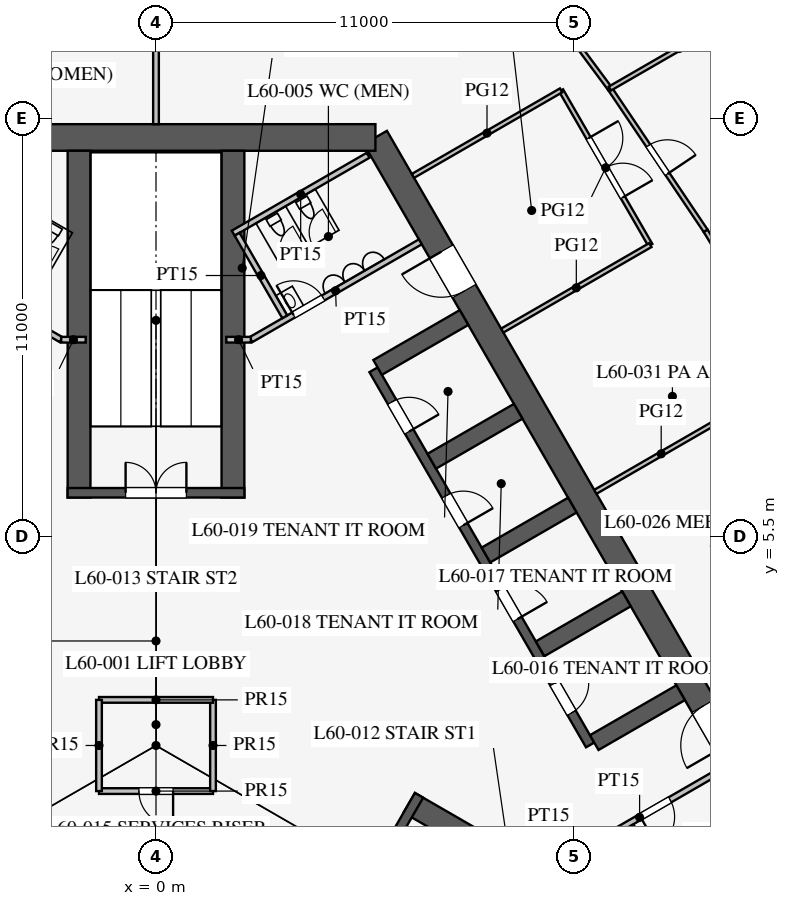
"""IFC4 building model, lengths in metres.
Left out: names, types, materials, properties, quantities, classifications, styles, units other than length and angle.
Written with IfcOpenShell. Run it as: python <this file> out.ifc"""

import sys

from ifc_helpers import new_model, si_unit, direction, frame, frame_2d, origin, place, context, subcontext, project, spatial, rectangle, extrude, element, fill, save


model = new_model("IFC4")
c1 = context("Model", 3, precision=1e-05, world=origin(), true_north=direction((0.0, 1.0)))
c2 = subcontext(c1, "Body", "Model", "MODEL_VIEW")
j1 = project(units=[si_unit("LENGTHUNIT", "METRE"), si_unit("PLANEANGLEUNIT", "RADIAN")], contexts=[c1])
p1 = place(None, origin())
s1 = spatial("IfcSite", under=j1, at=p1, CompositionType="ELEMENT")
p2 = place(p1, origin())
s2 = spatial("IfcBuilding", under=s1, at=p2, CompositionType="ELEMENT")
p3 = place(p2, frame((0.0, 0.0, 261.1)))
s3 = spatial("IfcBuildingStorey", under=s2, at=p3, CompositionType="ELEMENT", Elevation=261.1)
p4 = place(p3, frame((16.743, -3.0, 0.0), z_axis=(0.0, 0.0, 1.0), x_axis=(-0.500002442456, 0.866023993627, 0.0)))
e1 = element("IfcWall", 1, at=p4, inside=s3, PredefinedType="SHEAR", context=c2, shape_type="SweptSolid", body=[
    extrude(rectangle(XDim=21.939, YDim=0.7, at=frame_2d((10.97, 0.0))), origin(), (0.0, 0.0, 1.0), 4.2),
])
p5 = place(p4, frame((17.27, 0.0, 0.0)))
e2 = element("IfcOpeningElement", 2, at=p5, cuts=e1, PredefinedType="OPENING", context=c2, shape_type="SweptSolid", body=[
    extrude(rectangle(XDim=1.2, YDim=2.1, at=frame_2d((0.6, 1.05))), frame((0.0, 0.36, 0.0), z_axis=(0.0, -1.0, 0.0), x_axis=(1.0, 0.0, 0.0)), (0.0, 0.0, 1.0), 0.72),
])
p6 = place(p4, frame((3.47, 0.0, 0.0)))
e3 = element("IfcOpeningElement", 3, at=p6, cuts=e1, PredefinedType="OPENING", context=c2, shape_type="SweptSolid", body=[
    extrude(rectangle(XDim=1.2, YDim=2.1, at=frame_2d((0.6, 1.05))), frame((0.0, 0.36, 0.0), z_axis=(0.0, -1.0, 0.0), x_axis=(1.0, 0.0, 0.0)), (0.0, 0.0, 1.0), 0.72),
])
p7 = place(p3, frame((5.773, 16.0, 0.0), z_axis=(0.0, 0.0, 1.0), x_axis=(-1.0, 0.0, 0.0)))
e4 = element("IfcWall", 4, at=p7, inside=s3, PredefinedType="SHEAR", context=c2, shape_type="SweptSolid", body=[
    extrude(rectangle(XDim=11.547, YDim=0.7, at=frame_2d((5.773, 0.0))), origin(), (0.0, 0.0, 1.0), 4.2),
])
p8 = place(p3, frame((11.424, 0.014, 0.0), z_axis=(0.0, 0.0, 1.0), x_axis=(-0.500001763848, 0.866024385424, 0.0)))
e5 = element("IfcWall", 5, at=p8, inside=s3, PredefinedType="SHEAR", context=c2, shape_type="SweptSolid", body=[
    extrude(rectangle(XDim=11.4, YDim=0.25, at=frame_2d((5.7, 0.0))), origin(), (0.0, 0.0, 1.0), 4.2),
])
p9 = place(p8, frame((0.975, 0.0, 0.0)))
e6 = element("IfcOpeningElement", 6, at=p9, cuts=e5, PredefinedType="OPENING", context=c2, shape_type="SweptSolid", body=[
    extrude(rectangle(XDim=0.9, YDim=2.1, at=frame_2d((0.45, 1.05))), frame((0.0, 0.135, 0.0), z_axis=(0.0, -1.0, 0.0), x_axis=(1.0, 0.0, 0.0)), (0.0, 0.0, 1.0), 0.27),
])
p10 = place(p8, frame((3.825, 0.0, 0.0)))
e7 = element("IfcOpeningElement", 7, at=p10, cuts=e5, PredefinedType="OPENING", context=c2, shape_type="SweptSolid", body=[
    extrude(rectangle(XDim=0.9, YDim=2.1, at=frame_2d((0.45, 1.05))), frame((0.0, 0.135, 0.0), z_axis=(0.0, -1.0, 0.0), x_axis=(1.0, 0.0, 0.0)), (0.0, 0.0, 1.0), 0.27),
])
p11 = place(p8, frame((6.675, 0.0, 0.0)))
e8 = element("IfcOpeningElement", 8, at=p11, cuts=e5, PredefinedType="OPENING", context=c2, shape_type="SweptSolid", body=[
    extrude(rectangle(XDim=0.9, YDim=2.1, at=frame_2d((0.45, 1.05))), frame((0.0, 0.135, 0.0), z_axis=(0.0, -1.0, 0.0), x_axis=(1.0, 0.0, 0.0)), (0.0, 0.0, 1.0), 0.27),
])
p12 = place(p8, frame((9.525, 0.0, 0.0)))
e9 = element("IfcOpeningElement", 9, at=p12, cuts=e5, PredefinedType="OPENING", context=c2, shape_type="SweptSolid", body=[
    extrude(rectangle(XDim=0.9, YDim=2.1, at=frame_2d((0.45, 1.05))), frame((0.0, 0.135, 0.0), z_axis=(0.0, -1.0, 0.0), x_axis=(1.0, 0.0, 0.0)), (0.0, 0.0, 1.0), 0.27),
])
for number, where, z_axis, x_axis in (
    (10, (11.532, 0.076, 0.0), (0.0, 0.0, 1.0), (0.866, 0.5, 0.0)),
    (11, (10.107, 2.544, 0.0), (0.0, 0.0, 1.0), (0.866, 0.5, 0.0)),
    (12, (8.682, 5.012, 0.0), (0.0, 0.0, 1.0), (0.866, 0.5, 0.0)),
    (13, (7.257, 7.481, 0.0), (0.0, 0.0, 1.0), (0.866, 0.5, 0.0)),
    (14, (5.832, 9.949, 0.0), (0.0, 0.0, 1.0), (0.866, 0.5, 0.0)),
):
    element("IfcWall", number, at=place(p3, frame(where, z_axis=z_axis, x_axis=x_axis)), inside=s3, PredefinedType="SHEAR", context=c2, shape_type="SweptSolid", body=[
        extrude(rectangle(XDim=2.625, YDim=0.45, at=frame_2d((1.312, 0.0))), origin(), (0.0, 0.0, 1.0), 4.2),
    ])
p13 = place(p3, frame((6.663, -1.509, 0.0), z_axis=(0.0, 0.0, 1.0), x_axis=(0.866028310072, -0.499994966129, 0.0)))
e15 = element("IfcWall", 15, at=p13, inside=s3, PredefinedType="SHEAR", context=c2, shape_type="SweptSolid", body=[
    extrude(rectangle(XDim=9.125, YDim=0.6, at=frame_2d((4.562, 0.0))), origin(), (0.0, 0.0, 1.0), 4.2),
])
p14 = place(p3, frame((4.597, -5.339, 0.0), z_axis=(0.0, 0.0, 1.0), x_axis=(0.499984536904, 0.866034331223, 0.0)))
e16 = element("IfcWall", 16, at=p14, inside=s3, PredefinedType="SHEAR", context=c2, shape_type="SweptSolid", body=[
    extrude(rectangle(XDim=4.65, YDim=0.25, at=frame_2d((2.325, 0.0))), origin(), (0.0, 0.0, 1.0), 4.2),
])
p15 = place(p14, frame((1.525, 0.0, 0.0)))
e17 = element("IfcOpeningElement", 17, at=p15, cuts=e16, PredefinedType="OPENING", context=c2, shape_type="SweptSolid", body=[
    extrude(rectangle(XDim=1.6, YDim=2.1, at=frame_2d((0.8, 1.05))), frame((0.0, 0.135, 0.0), z_axis=(0.0, -1.0, 0.0), x_axis=(1.0, 0.0, 0.0)), (0.0, 0.0, 1.0), 0.27),
])
for number, where, z_axis, x_axis in (
    (18, (2.025, 6.525, 0.0), (0.0, 0.0, 1.0), (0.0, 1.0, 0.0)),
    (19, (-2.025, 6.525, 0.0), (0.0, 0.0, 1.0), (0.0, 1.0, 0.0)),
):
    element("IfcWall", number, at=place(p3, frame(where, z_axis=z_axis, x_axis=x_axis)), inside=s3, PredefinedType="SHEAR", context=c2, shape_type="SweptSolid", body=[
        extrude(rectangle(XDim=9.125, YDim=0.6, at=frame_2d((4.562, 0.0))), origin(), (0.0, 0.0, 1.0), 4.2),
    ])
p16 = place(p3, frame((2.325, 6.65, 0.0), z_axis=(0.0, 0.0, 1.0), x_axis=(-1.0, 0.0, 0.0)))
e20 = element("IfcWall", 20, at=p16, inside=s3, PredefinedType="SHEAR", context=c2, shape_type="SweptSolid", body=[
    extrude(rectangle(XDim=4.65, YDim=0.25, at=frame_2d((2.325, 0.0))), origin(), (0.0, 0.0, 1.0), 4.2),
])
p17 = place(p16, frame((1.525, 0.0, 0.0)))
e21 = element("IfcOpeningElement", 21, at=p17, cuts=e20, PredefinedType="OPENING", context=c2, shape_type="SweptSolid", body=[
    extrude(rectangle(XDim=1.6, YDim=2.1, at=frame_2d((0.8, 1.05))), frame((0.0, 0.135, 0.0), z_axis=(0.0, -1.0, 0.0), x_axis=(1.0, 0.0, 0.0)), (0.0, 0.0, 1.0), 0.27),
])
p18 = place(p3, frame((2.495, 10.678, 0.0), z_axis=(0.0, 0.0, 1.0), x_axis=(0.866037967349, 0.499978238636, 0.0)))
e22 = element("IfcWall", 22, at=p18, inside=s3, PredefinedType="PARTITIONING", context=c2, shape_type="SweptSolid", body=[
    extrude(rectangle(XDim=5.15, YDim=0.15, at=frame_2d((2.575, 0.0))), origin(), (0.0, 0.0, 1.0), 3.95),
])
p19 = place(p18, frame((1.3, 0.0, 0.0)))
e23 = element("IfcOpeningElement", 23, at=p19, cuts=e22, PredefinedType="OPENING", context=c2, shape_type="SweptSolid", body=[
    extrude(rectangle(XDim=0.9, YDim=2.1, at=frame_2d((0.45, 1.05))), frame((0.0, 0.085, 0.0), z_axis=(0.0, -1.0, 0.0), x_axis=(1.0, 0.0, 0.0)), (0.0, 0.0, 1.0), 0.17),
])
p20 = place(p3, frame((10.495, -3.178, 0.0), z_axis=(0.0, 0.0, 1.0), x_axis=(0.866037967349, 0.499978238636, 0.0)))
e24 = element("IfcWall", 24, at=p20, inside=s3, PredefinedType="PARTITIONING", context=c2, shape_type="SweptSolid", body=[
    extrude(rectangle(XDim=5.15, YDim=0.15, at=frame_2d((2.575, 0.0))), origin(), (0.0, 0.0, 1.0), 3.95),
])
p21 = place(p20, frame((2.6, 0.0, 0.0)))
e25 = element("IfcOpeningElement", 25, at=p21, cuts=e24, PredefinedType="OPENING", context=c2, shape_type="SweptSolid", body=[
    extrude(rectangle(XDim=0.9, YDim=2.1, at=frame_2d((0.45, 1.05))), frame((0.0, 0.085, 0.0), z_axis=(0.0, -1.0, 0.0), x_axis=(1.0, 0.0, 0.0)), (0.0, 0.0, 1.0), 0.17),
])
p22 = place(p3, frame((-2.495, 10.678, 0.0), z_axis=(0.0, 0.0, 1.0), x_axis=(-0.866037967349, 0.499978238636, 0.0)))
e26 = element("IfcWall", 26, at=p22, inside=s3, PredefinedType="PARTITIONING", context=c2, shape_type="SweptSolid", body=[
    extrude(rectangle(XDim=5.15, YDim=0.15, at=frame_2d((2.575, 0.0))), origin(), (0.0, 0.0, 1.0), 3.95),
])
p23 = place(p22, frame((2.6, 0.0, 0.0)))
e27 = element("IfcOpeningElement", 27, at=p23, cuts=e26, PredefinedType="OPENING", context=c2, shape_type="SweptSolid", body=[
    extrude(rectangle(XDim=0.9, YDim=2.1, at=frame_2d((0.45, 1.05))), frame((0.0, 0.085, 0.0), z_axis=(0.0, -1.0, 0.0), x_axis=(1.0, 0.0, 0.0)), (0.0, 0.0, 1.0), 0.17),
])
for number, where, z_axis, x_axis in (
    (28, (2.495, 10.678, 0.0), (0.0, 0.0, 1.0), (-1.0, 0.0, 0.0)),
    (29, (-2.495, 10.678, 0.0), (0.0, 0.0, 1.0), (1.0, 0.0, 0.0)),
):
    element("IfcWall", number, at=place(p3, frame(where, z_axis=z_axis, x_axis=x_axis)), inside=s3, PredefinedType="PARTITIONING", context=c2, shape_type="SweptSolid", body=[
        extrude(rectangle(XDim=0.645, YDim=0.15, at=frame_2d((0.323, 0.0))), origin(), (0.0, 0.0, 1.0), 3.95),
    ])
p24 = place(p3, frame((2.031, 13.482, 0.0), z_axis=(0.0, 0.0, 1.0), x_axis=(0.866050731258, 0.499956128963, 0.0)))
e30 = element("IfcWall", 30, at=p24, inside=s3, PredefinedType="PARTITIONING", context=c2, shape_type="SweptSolid", body=[
    extrude(rectangle(XDim=4.1, YDim=0.15, at=frame_2d((2.05, 0.0))), origin(), (0.0, 0.0, 1.0), 3.95),
])
p25 = place(p3, frame((3.389, 11.281, 0.0), z_axis=(0.0, 0.0, 1.0), x_axis=(-0.499989096993, 0.866031698547, 0.0)))
e31 = element("IfcWall", 31, at=p25, inside=s3, PredefinedType="PARTITIONING", context=c2, shape_type="SweptSolid", body=[
    extrude(rectangle(XDim=2.51, YDim=0.15, at=frame_2d((1.255, 0.0))), origin(), (0.0, 0.0, 1.0), 3.95),
])
p26 = place(p3, frame((-1.5, -1.2, 0.0), z_axis=(0.0, 0.0, 1.0), x_axis=(1.0, 0.0, 0.0)))
e32 = element("IfcWall", 32, at=p26, inside=s3, PredefinedType="PARTITIONING", context=c2, shape_type="SweptSolid", body=[
    extrude(rectangle(XDim=3.0, YDim=0.15, at=frame_2d((1.5, 0.0))), origin(), (0.0, 0.0, 1.0), 3.95),
])
p27 = place(p26, frame((1.05, 0.0, 0.0)))
e33 = element("IfcOpeningElement", 33, at=p27, cuts=e32, PredefinedType="OPENING", context=c2, shape_type="SweptSolid", body=[
    extrude(rectangle(XDim=0.9, YDim=2.1, at=frame_2d((0.45, 1.05))), frame((0.0, 0.085, 0.0), z_axis=(0.0, -1.0, 0.0), x_axis=(1.0, 0.0, 0.0)), (0.0, 0.0, 1.0), 0.17),
])
p28 = place(p3, frame((1.5, -1.2, 0.0), z_axis=(0.0, 0.0, 1.0), x_axis=(0.0, 1.0, 0.0)))
e34 = element("IfcWall", 34, at=p28, inside=s3, PredefinedType="PARTITIONING", context=c2, shape_type="SweptSolid", body=[
    extrude(rectangle(XDim=2.4, YDim=0.15, at=frame_2d((1.2, 0.0))), origin(), (0.0, 0.0, 1.0), 3.95),
])
p29 = place(p3, frame((1.5, 1.2, 0.0), z_axis=(0.0, 0.0, 1.0), x_axis=(-1.0, 0.0, 0.0)))
e35 = element("IfcWall", 35, at=p29, inside=s3, PredefinedType="PARTITIONING", context=c2, shape_type="SweptSolid", body=[
    extrude(rectangle(XDim=3.0, YDim=0.15, at=frame_2d((1.5, 0.0))), origin(), (0.0, 0.0, 1.0), 3.95),
])
p30 = place(p3, frame((-1.5, 1.2, 0.0), z_axis=(0.0, 0.0, 1.0), x_axis=(0.0, -1.0, 0.0)))
e36 = element("IfcWall", 36, at=p30, inside=s3, PredefinedType="PARTITIONING", context=c2, shape_type="SweptSolid", body=[
    extrude(rectangle(XDim=2.4, YDim=0.15, at=frame_2d((1.2, 0.0))), origin(), (0.0, 0.0, 1.0), 3.95),
])
p31 = place(p3, frame((0.0, 16.35, 0.0), z_axis=(0.0, 0.0, 1.0), x_axis=(0.0, 1.0, 0.0)))
e37 = element("IfcWall", 37, at=p31, inside=s3, PredefinedType="PARTITIONING", context=c2, shape_type="SweptSolid", body=[
    extrude(rectangle(XDim=15.0, YDim=0.15, at=frame_2d((7.5, 0.0))), origin(), (0.0, 0.0, 1.0), 1.95),
])
p32 = place(p3, frame((13.009, 13.168, 0.0), z_axis=(0.0, 0.0, 1.0), x_axis=(-0.500016218704, 0.866016039709, 0.0)))
e38 = element("IfcWall", 38, at=p32, inside=s3, PredefinedType="PARTITIONING", context=c2, shape_type="SweptSolid", body=[
    extrude(rectangle(XDim=4.7, YDim=0.12, at=frame_2d((2.35, 0.0))), origin(), (0.0, 0.0, 1.0), 2.9),
])
p33 = place(p32, frame((1.45, 0.0, 0.15)))
e39 = element("IfcOpeningElement", 39, at=p33, cuts=e38, PredefinedType="OPENING", context=c2, shape_type="SweptSolid", body=[
    extrude(rectangle(XDim=1.8, YDim=2.1, at=frame_2d((0.9, 1.05))), frame((0.0, 0.07, 0.0), z_axis=(0.0, -1.0, 0.0), x_axis=(1.0, 0.0, 0.0)), (0.0, 0.0, 1.0), 0.14),
])
p34 = place(p3, frame((9.111, 10.918, 0.0), z_axis=(0.0, 0.0, 1.0), x_axis=(0.866031096941, 0.499990139034, 0.0)))
e40 = element("IfcWall", 40, at=p34, inside=s3, PredefinedType="PARTITIONING", context=c2, shape_type="SweptSolid", body=[
    extrude(rectangle(XDim=4.5, YDim=0.12, at=frame_2d((2.25, 0.0))), origin(), (0.0, 0.0, 1.0), 2.9),
])
p35 = place(p3, frame((6.761, 14.989, 0.0), z_axis=(0.0, 0.0, 1.0), x_axis=(0.866017533419, 0.500013631625, 0.0)))
e41 = element("IfcWall", 41, at=p35, inside=s3, PredefinedType="PARTITIONING", context=c2, shape_type="SweptSolid", body=[
    extrude(rectangle(XDim=4.5, YDim=0.12, at=frame_2d((2.25, 0.0))), origin(), (0.0, 0.0, 1.0), 2.9),
])
p36 = place(p3, frame((11.562, 6.675, 0.0), z_axis=(0.0, 0.0, 1.0), x_axis=(0.866026010844, 0.49999894854, 0.0)))
e42 = element("IfcWall", 42, at=p36, inside=s3, PredefinedType="PARTITIONING", context=c2, shape_type="SweptSolid", body=[
    extrude(rectangle(XDim=4.0, YDim=0.12, at=frame_2d((2.0, 0.0))), origin(), (0.0, 0.0, 1.0), 2.35),
])
p37 = place(p3, frame((14.361, 1.825, 0.0), z_axis=(0.0, 0.0, 1.0), x_axis=(0.866026010844, 0.49999894854, 0.0)))
e43 = element("IfcWall", 43, at=p37, inside=s3, PredefinedType="PARTITIONING", context=c2, shape_type="SweptSolid", body=[
    extrude(rectangle(XDim=4.0, YDim=0.12, at=frame_2d((2.0, 0.0))), origin(), (0.0, 0.0, 1.0), 2.9),
])
p38 = place(p3, frame((16.802, 9.7, 0.0), z_axis=(0.0, 0.0, 1.0), x_axis=(-0.519790350351, 0.85429385558, 0.0)))
e44 = element("IfcWall", 44, at=p38, inside=s3, PredefinedType="PARTITIONING", context=c2, shape_type="SweptSolid", body=[
    extrude(rectangle(XDim=4.501, YDim=0.12, at=frame_2d((2.25, 0.0))), origin(), (0.0, 0.0, 1.0), 2.9),
])
p39 = place(p3, frame((14.462, 13.546, 0.0), z_axis=(0.0, 0.0, 1.0), x_axis=(-0.55850386778, 0.829501916619, 0.0)))
e45 = element("IfcWall", 45, at=p39, inside=s3, PredefinedType="PARTITIONING", context=c2, shape_type="SweptSolid", body=[
    extrude(rectangle(XDim=4.511, YDim=0.12, at=frame_2d((2.255, 0.0))), origin(), (0.0, 0.0, 1.0), 2.9),
])
p40 = place(p39, frame((1.8, 0.0, 0.15)))
e46 = element("IfcOpeningElement", 46, at=p40, cuts=e45, PredefinedType="OPENING", context=c2, shape_type="SweptSolid", body=[
    extrude(rectangle(XDim=0.9, YDim=2.1, at=frame_2d((0.45, 1.05))), frame((0.0, 0.07, 0.0), z_axis=(0.0, -1.0, 0.0), x_axis=(1.0, 0.0, 0.0)), (0.0, 0.0, 1.0), 0.14),
])
p41 = place(p3, frame((11.943, 17.287, 0.0), z_axis=(0.0, 0.0, 1.0), x_axis=(-0.59613842716, 0.802881669777, 0.0)))
e47 = element("IfcWall", 47, at=p41, inside=s3, PredefinedType="PARTITIONING", context=c2, shape_type="SweptSolid", body=[
    extrude(rectangle(XDim=4.53, YDim=0.12, at=frame_2d((2.265, 0.0))), origin(), (0.0, 0.0, 1.0), 2.9),
])
p42 = place(p3, frame((11.943, 17.287, 0.0), z_axis=(0.0, 0.0, 1.0), x_axis=(0.866016734951, 0.50001501456, 0.0)))
e48 = element("IfcWall", 48, at=p42, inside=s3, PredefinedType="PARTITIONING", context=c2, shape_type="SweptSolid", body=[
    extrude(rectangle(XDim=4.214, YDim=0.12, at=frame_2d((2.107, 0.0))), origin(), (0.0, 0.0, 1.0), 2.35),
])
p43 = place(p19, origin())
e49 = element("IfcDoor", 49, at=p43, inside=s3, OperationType="SINGLE_SWING_LEFT", PredefinedType="DOOR", context=c2, shape_type="SweptSolid", body=[
    extrude(rectangle(XDim=0.9, YDim=2.1, at=frame_2d((0.45, 1.05))), frame((0.0, 0.025, 0.0), z_axis=(0.0, -1.0, 0.0), x_axis=(1.0, 0.0, 0.0)), (0.0, 0.0, 1.0), 0.05),
])
fill(e23, e49)
p44 = place(p21, frame((0.9, 0.0, 0.0), z_axis=(0.0, 0.0, 1.0), x_axis=(-1.0, 0.0, 0.0)))
e50 = element("IfcDoor", 50, at=p44, inside=s3, OperationType="SINGLE_SWING_RIGHT", PredefinedType="DOOR", context=c2, shape_type="SweptSolid", body=[
    extrude(rectangle(XDim=0.9, YDim=2.1, at=frame_2d((0.45, 1.05))), frame((0.0, 0.025, 0.0), z_axis=(0.0, -1.0, 0.0), x_axis=(1.0, 0.0, 0.0)), (0.0, 0.0, 1.0), 0.05),
])
fill(e25, e50)
p45 = place(p27, frame((0.9, 0.0, 0.0), z_axis=(0.0, 0.0, 1.0), x_axis=(-1.0, 0.0, 0.0)))
e51 = element("IfcDoor", 51, at=p45, inside=s3, OperationType="SINGLE_SWING_LEFT", PredefinedType="DOOR", context=c2, shape_type="SweptSolid", body=[
    extrude(rectangle(XDim=0.9, YDim=2.1, at=frame_2d((0.45, 1.05))), frame((0.0, 0.025, 0.0), z_axis=(0.0, -1.0, 0.0), x_axis=(1.0, 0.0, 0.0)), (0.0, 0.0, 1.0), 0.05),
])
fill(e33, e51)
p46 = place(p17, frame((1.6, 0.0, 0.0), z_axis=(0.0, 0.0, 1.0), x_axis=(-1.0, 0.0, 0.0)))
e52 = element("IfcDoor", 52, at=p46, inside=s3, OperationType="DOUBLE_DOOR_SINGLE_SWING", PredefinedType="DOOR", context=c2, shape_type="SweptSolid", body=[
    extrude(rectangle(XDim=1.6, YDim=2.1, at=frame_2d((0.8, 1.05))), frame((0.0, 0.025, 0.0), z_axis=(0.0, -1.0, 0.0), x_axis=(1.0, 0.0, 0.0)), (0.0, 0.0, 1.0), 0.05),
])
fill(e21, e52)
p47 = place(p5, origin())
e53 = element("IfcDoor", 53, at=p47, inside=s3, OperationType="SINGLE_SWING_RIGHT", PredefinedType="DOOR", context=c2, shape_type="SweptSolid", body=[
    extrude(rectangle(XDim=1.2, YDim=2.1, at=frame_2d((0.6, 1.05))), frame((0.0, 0.025, 0.0), z_axis=(0.0, -1.0, 0.0), x_axis=(1.0, 0.0, 0.0)), (0.0, 0.0, 1.0), 0.05),
])
fill(e2, e53)
p48 = place(p6, origin())
e54 = element("IfcDoor", 54, at=p48, inside=s3, OperationType="SINGLE_SWING_LEFT", PredefinedType="DOOR", context=c2, shape_type="SweptSolid", body=[
    extrude(rectangle(XDim=1.2, YDim=2.1, at=frame_2d((0.6, 1.05))), frame((0.0, 0.025, 0.0), z_axis=(0.0, -1.0, 0.0), x_axis=(1.0, 0.0, 0.0)), (0.0, 0.0, 1.0), 0.05),
])
fill(e3, e54)
p49 = place(p9, frame((0.9, 0.0, 0.0), z_axis=(0.0, 0.0, 1.0), x_axis=(-1.0, 0.0, 0.0)))
e55 = element("IfcDoor", 55, at=p49, inside=s3, OperationType="SINGLE_SWING_LEFT", PredefinedType="DOOR", context=c2, shape_type="SweptSolid", body=[
    extrude(rectangle(XDim=0.9, YDim=2.1, at=frame_2d((0.45, 1.05))), frame((0.0, 0.025, 0.0), z_axis=(0.0, -1.0, 0.0), x_axis=(1.0, 0.0, 0.0)), (0.0, 0.0, 1.0), 0.05),
])
fill(e6, e55)
p50 = place(p10, frame((0.9, 0.0, 0.0), z_axis=(0.0, 0.0, 1.0), x_axis=(-1.0, 0.0, 0.0)))
e56 = element("IfcDoor", 56, at=p50, inside=s3, OperationType="SINGLE_SWING_RIGHT", PredefinedType="DOOR", context=c2, shape_type="SweptSolid", body=[
    extrude(rectangle(XDim=0.9, YDim=2.1, at=frame_2d((0.45, 1.05))), frame((0.0, 0.025, 0.0), z_axis=(0.0, -1.0, 0.0), x_axis=(1.0, 0.0, 0.0)), (0.0, 0.0, 1.0), 0.05),
])
fill(e7, e56)
p51 = place(p11, frame((0.9, 0.0, 0.0), z_axis=(0.0, 0.0, 1.0), x_axis=(-1.0, 0.0, 0.0)))
e57 = element("IfcDoor", 57, at=p51, inside=s3, OperationType="SINGLE_SWING_RIGHT", PredefinedType="DOOR", context=c2, shape_type="SweptSolid", body=[
    extrude(rectangle(XDim=0.9, YDim=2.1, at=frame_2d((0.45, 1.05))), frame((0.0, 0.025, 0.0), z_axis=(0.0, -1.0, 0.0), x_axis=(1.0, 0.0, 0.0)), (0.0, 0.0, 1.0), 0.05),
])
fill(e8, e57)
p52 = place(p12, frame((0.9, 0.0, 0.0), z_axis=(0.0, 0.0, 1.0), x_axis=(-1.0, 0.0, 0.0)))
e58 = element("IfcDoor", 58, at=p52, inside=s3, OperationType="SINGLE_SWING_RIGHT", PredefinedType="DOOR", context=c2, shape_type="SweptSolid", body=[
    extrude(rectangle(XDim=0.9, YDim=2.1, at=frame_2d((0.45, 1.05))), frame((0.0, 0.025, 0.0), z_axis=(0.0, -1.0, 0.0), x_axis=(1.0, 0.0, 0.0)), (0.0, 0.0, 1.0), 0.05),
])
fill(e9, e58)
p53 = place(p33, frame((1.8, 0.0, 0.0), z_axis=(0.0, 0.0, 1.0), x_axis=(-1.0, 0.0, 0.0)))
e59 = element("IfcDoor", 59, at=p53, inside=s3, OperationType="DOUBLE_DOOR_SINGLE_SWING", PredefinedType="DOOR", context=c2, shape_type="SweptSolid", body=[
    extrude(rectangle(XDim=1.8, YDim=2.1, at=frame_2d((0.9, 1.05))), frame((0.0, 0.025, 0.0), z_axis=(0.0, -1.0, 0.0), x_axis=(1.0, 0.0, 0.0)), (0.0, 0.0, 1.0), 0.05),
])
fill(e39, e59)
p54 = place(p40, frame((0.9, 0.0, 0.0), z_axis=(0.0, 0.0, 1.0), x_axis=(-1.0, 0.0, 0.0)))
e60 = element("IfcDoor", 60, at=p54, inside=s3, OperationType="SINGLE_SWING_RIGHT", PredefinedType="DOOR", context=c2, shape_type="SweptSolid", body=[
    extrude(rectangle(XDim=0.9, YDim=2.1, at=frame_2d((0.45, 1.05))), frame((0.0, 0.025, 0.0), z_axis=(0.0, -1.0, 0.0), x_axis=(1.0, 0.0, 0.0)), (0.0, 0.0, 1.0), 0.05),
])
fill(e46, e60)
save(model, sys.argv[1])
